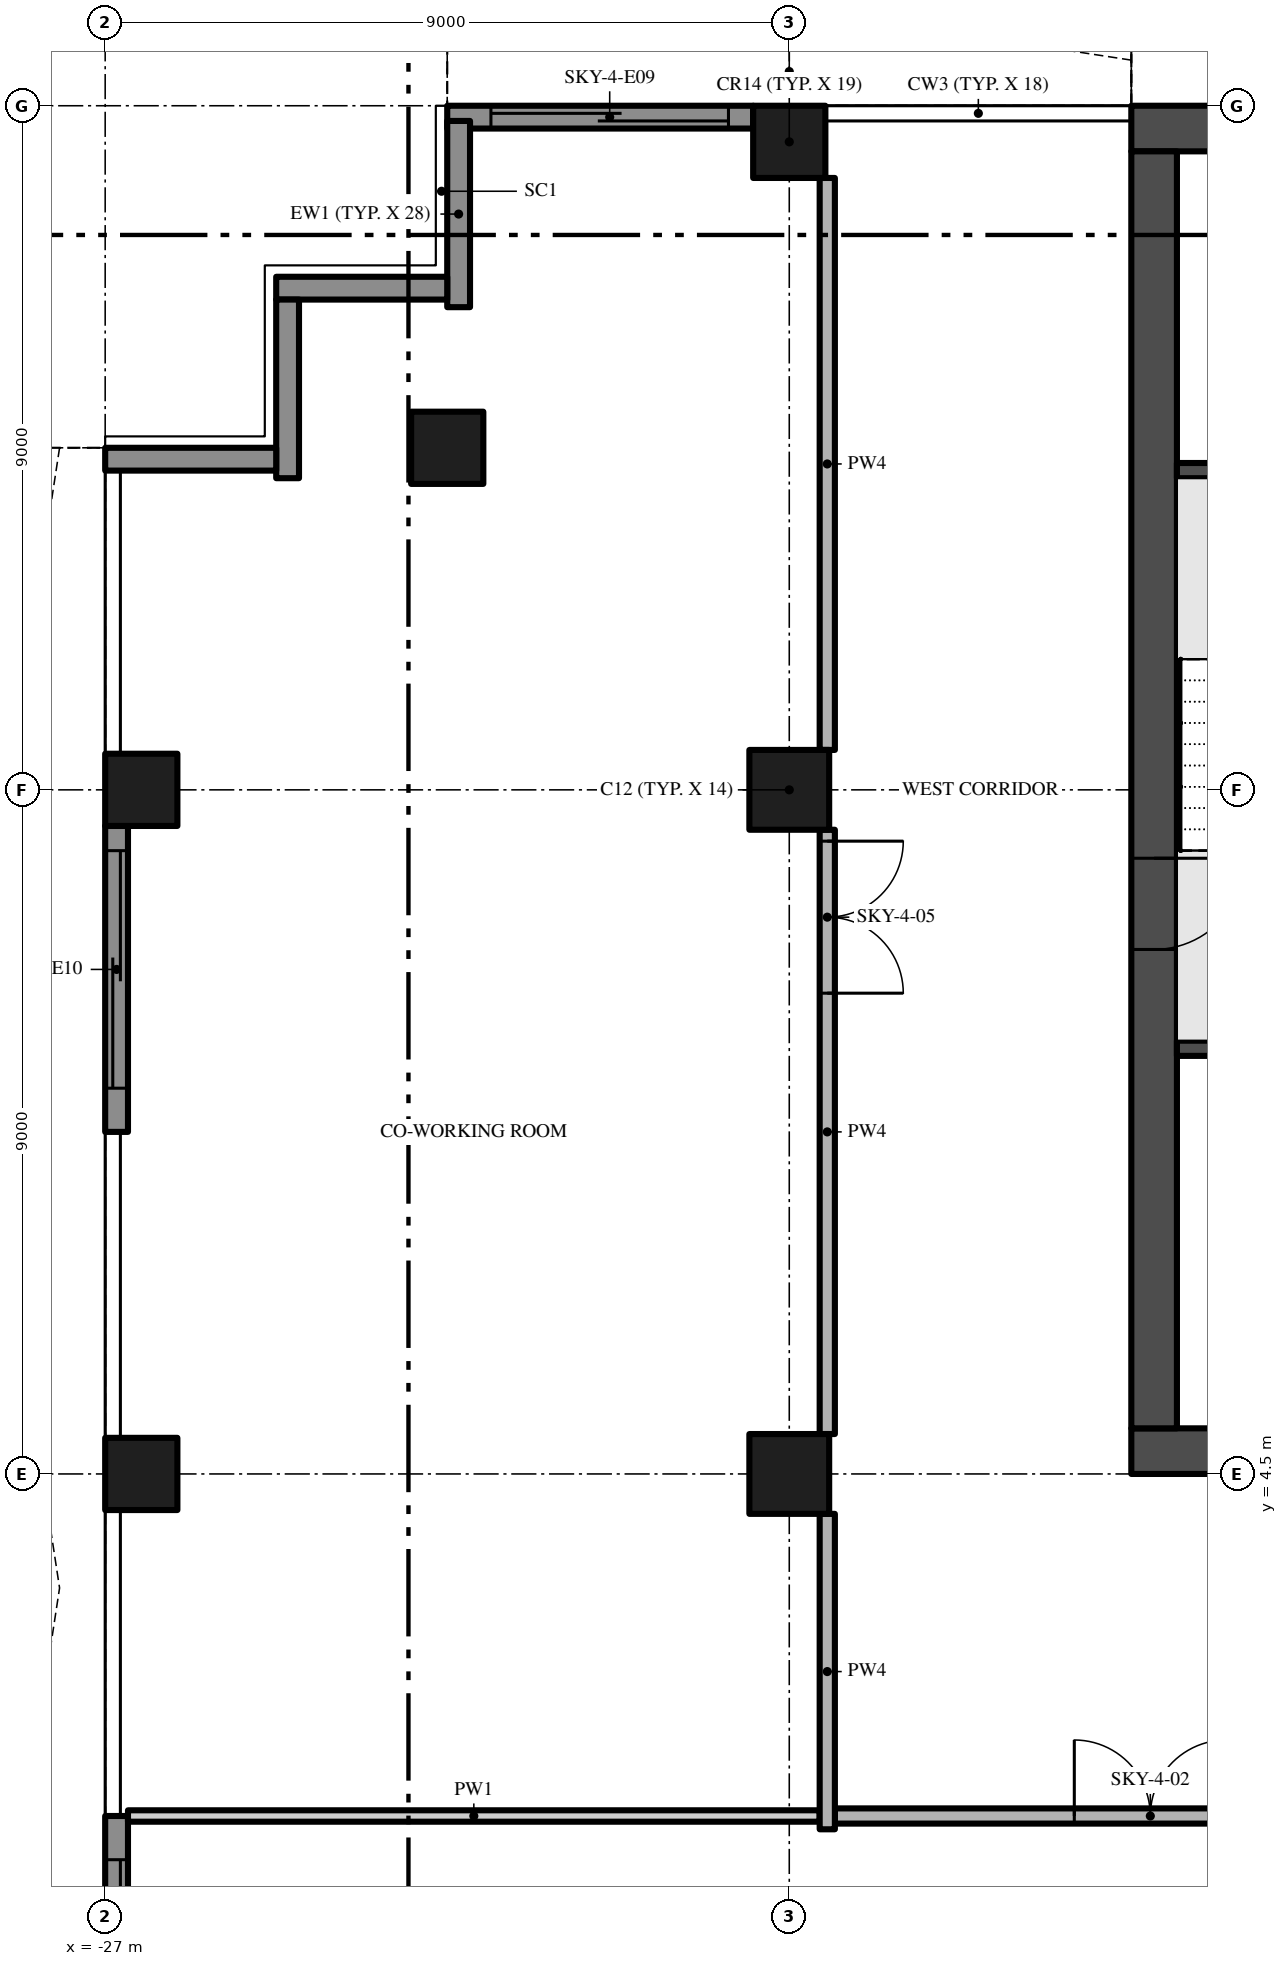
"""IFC4 building model, lengths in metres.
Left out: names, types, materials, properties, quantities, classifications, styles, units other than length and angle.
Written with IfcOpenShell. Run it as: python <this file> out.ifc"""

import sys

from ifc_helpers import new_model, si_unit, direction, frame, frame_2d, origin, origin_2d, place, context, subcontext, project, spatial, polyline, rectangle, outline, extrude, element, fill, save


model = new_model("IFC4")
c1 = context("Model", 3, precision=1e-05, world=origin(), true_north=direction((0.0, 1.0)))
c2 = subcontext(c1, "Body", "Model", "MODEL_VIEW")
j1 = project(units=[si_unit("LENGTHUNIT", "METRE"), si_unit("PLANEANGLEUNIT", "RADIAN")], contexts=[c1])
p1 = place(None, origin())
s1 = spatial("IfcSite", under=j1, at=p1, CompositionType="ELEMENT")
p2 = place(p1, origin())
s2 = spatial("IfcBuilding", under=s1, at=p2, CompositionType="ELEMENT")
p3 = place(p2, frame((0.0, 0.0, 233.8)))
s3 = spatial("IfcBuildingStorey", under=s2, at=p3, CompositionType="ELEMENT", Elevation=233.8)
p4 = place(p3, frame((-13.5, 4.8, -0.3), z_axis=(0.0, 0.0, 1.0), x_axis=(1.0, 0.0, 0.0)))
e1 = element("IfcWall", 1, at=p4, inside=s3, PredefinedType="SHEAR", context=c2, shape_type="SweptSolid", body=[
    extrude(rectangle(XDim=27.0, YDim=0.6, at=frame_2d((13.5, 0.0))), origin(), (0.0, 0.0, 1.0), 5.0),
])
p5 = place(p4, frame((12.0, 0.0, 0.3)))
e2 = element("IfcOpeningElement", 2, at=p5, cuts=e1, PredefinedType="OPENING", context=c2, shape_type="SweptSolid", body=[
    extrude(rectangle(XDim=3.0, YDim=2.4, at=frame_2d((1.5, 1.2))), frame((0.0, 0.31, 0.0), z_axis=(0.0, -1.0, 0.0), x_axis=(1.0, 0.0, 0.0)), (0.0, 0.0, 1.0), 0.62),
])
p6 = place(p4, frame((4.9, 0.0, 0.3)))
e3 = element("IfcOpeningElement", 3, at=p6, cuts=e1, PredefinedType="OPENING", context=c2, shape_type="SweptSolid", body=[
    extrude(rectangle(XDim=1.2, YDim=2.2, at=frame_2d((0.6, 1.1))), frame((0.0, 0.31, 0.0), z_axis=(0.0, -1.0, 0.0), x_axis=(1.0, 0.0, 0.0)), (0.0, 0.0, 1.0), 0.62),
])
p7 = place(p4, frame((20.75, 0.0, 0.3)))
e4 = element("IfcOpeningElement", 4, at=p7, cuts=e1, PredefinedType="OPENING", context=c2, shape_type="SweptSolid", body=[
    extrude(rectangle(XDim=1.5, YDim=2.2, at=frame_2d((0.75, 1.1))), frame((0.0, 0.31, 0.0), z_axis=(0.0, -1.0, 0.0), x_axis=(1.0, 0.0, 0.0)), (0.0, 0.0, 1.0), 0.62),
])
p8 = place(p4, frame((17.4, 0.0, 0.3)))
e5 = element("IfcOpeningElement", 5, at=p8, cuts=e1, PredefinedType="OPENING", context=c2, shape_type="SweptSolid", body=[
    extrude(rectangle(XDim=1.2, YDim=2.2, at=frame_2d((0.6, 1.1))), frame((0.0, 0.31, 0.0), z_axis=(0.0, -1.0, 0.0), x_axis=(1.0, 0.0, 0.0)), (0.0, 0.0, 1.0), 0.62),
])
p9 = place(p3, frame((13.5, 22.2, -0.3), z_axis=(0.0, 0.0, 1.0), x_axis=(-1.0, 0.0, 0.0)))
e6 = element("IfcWall", 6, at=p9, inside=s3, PredefinedType="SHEAR", context=c2, shape_type="SweptSolid", body=[
    extrude(rectangle(XDim=27.0, YDim=0.6, at=frame_2d((13.5, 0.0))), origin(), (0.0, 0.0, 1.0), 5.0),
])
p10 = place(p3, frame((-13.2, 21.9, -0.3), z_axis=(0.0, 0.0, 1.0), x_axis=(0.0, -1.0, 0.0)))
e7 = element("IfcWall", 7, at=p10, inside=s3, PredefinedType="SHEAR", context=c2, shape_type="SweptSolid", body=[
    extrude(rectangle(XDim=16.8, YDim=0.6, at=frame_2d((8.4, 0.0))), origin(), (0.0, 0.0, 1.0), 5.0),
])
p11 = place(p10, frame((9.3, 0.0, 0.3)))
e8 = element("IfcOpeningElement", 8, at=p11, cuts=e7, PredefinedType="OPENING", context=c2, shape_type="SweptSolid", body=[
    extrude(rectangle(XDim=1.2, YDim=2.2, at=frame_2d((0.6, 1.1))), frame((0.0, 0.31, 0.0), z_axis=(0.0, -1.0, 0.0), x_axis=(1.0, 0.0, 0.0)), (0.0, 0.0, 1.0), 0.62),
])
p12 = place(p3, frame((-18.0, 13.5, 0.0), z_axis=(0.0, 0.0, 1.0), x_axis=(1.0, 0.0, 0.0)))
e9 = element("IfcColumn", 9, at=p12, inside=s3, PredefinedType="COLUMN", context=c2, shape_type="SweptSolid", body=[
    extrude(rectangle(XDim=1.05, YDim=1.05, at=origin_2d()), origin(), (0.0, 0.0, 1.0), 4.7),
])
p13 = place(p3, frame((-18.0, 22.025, 0.0), z_axis=(0.0, 0.0, 1.0), x_axis=(1.0, 0.0, 0.0)))
e10 = element("IfcColumn", 10, at=p13, inside=s3, PredefinedType="COLUMN", context=c2, shape_type="SweptSolid", body=[
    extrude(rectangle(XDim=0.95, YDim=0.95, at=origin_2d()), origin(), (0.0, 0.0, 1.0), 4.7),
])
p14 = place(p3, frame((-18.0, 4.5, 0.0), z_axis=(0.0, 0.0, 1.0), x_axis=(1.0, 0.0, 0.0)))
e11 = element("IfcColumn", 11, at=p14, inside=s3, PredefinedType="COLUMN", context=c2, shape_type="SweptSolid", body=[
    extrude(rectangle(XDim=1.05, YDim=1.05, at=origin_2d()), origin(), (0.0, 0.0, 1.0), 4.7),
])
for number, where, z_axis, x_axis in (
    (12, (-26.525, 13.5, 0.0), (0.0, 0.0, 1.0), (1.0, 0.0, 0.0)),
    (13, (-22.5, 18.0, 0.0), (0.0, 0.0, 1.0), (1.0, 0.0, 0.0)),
    (14, (-26.525, 4.5, 0.0), (0.0, 0.0, 1.0), (1.0, 0.0, 0.0)),
):
    element("IfcColumn", number, at=place(p3, frame(where, z_axis=z_axis, x_axis=x_axis)), inside=s3, PredefinedType="COLUMN", context=c2, shape_type="SweptSolid", body=[
        extrude(rectangle(XDim=0.95, YDim=0.95, at=origin_2d()), origin(), (0.0, 0.0, 1.0), 4.7),
    ])
p15 = place(p3, frame((-22.5, 22.35, 0.0), z_axis=(0.0, 0.0, 1.0), x_axis=(1.0, 0.0, 0.0)))
e15 = element("IfcWall", 15, at=p15, inside=s3, PredefinedType="SOLIDWALL", context=c2, shape_type="SweptSolid", body=[
    extrude(rectangle(XDim=4.025, YDim=0.3, at=frame_2d((2.013, 0.0))), origin(), (0.0, 0.0, 1.0), 4.7),
])
p16 = place(p15, frame((0.575, 0.0, 0.0)))
e16 = element("IfcOpeningElement", 16, at=p16, cuts=e15, PredefinedType="OPENING", context=c2, shape_type="SweptSolid", body=[
    extrude(rectangle(XDim=3.125, YDim=2.4, at=frame_2d((1.562, 1.2))), frame((0.0, 0.16, 0.0), z_axis=(0.0, -1.0, 0.0), x_axis=(1.0, 0.0, 0.0)), (0.0, 0.0, 1.0), 0.32),
])
p17 = place(p3, frame((-22.35, 19.85, 0.0), z_axis=(0.0, 0.0, 1.0), x_axis=(0.0, 1.0, 0.0)))
e17 = element("IfcWall", 17, at=p17, inside=s3, PredefinedType="SOLIDWALL", context=c2, shape_type="SweptSolid", body=[
    extrude(rectangle(XDim=2.45, YDim=0.3, at=frame_2d((1.225, 0.0))), origin(), (0.0, 0.0, 1.0), 4.7),
])
p18 = place(p3, frame((-24.75, 20.1, 0.0), z_axis=(0.0, 0.0, 1.0), x_axis=(1.0, 0.0, 0.0)))
e18 = element("IfcWall", 18, at=p18, inside=s3, PredefinedType="SOLIDWALL", context=c2, shape_type="SweptSolid", body=[
    extrude(rectangle(XDim=2.25, YDim=0.3, at=frame_2d((1.125, 0.0))), origin(), (0.0, 0.0, 1.0), 4.7),
])
p19 = place(p3, frame((-24.6, 17.6, 0.0), z_axis=(0.0, 0.0, 1.0), x_axis=(0.0, 1.0, 0.0)))
e19 = element("IfcWall", 19, at=p19, inside=s3, PredefinedType="SOLIDWALL", context=c2, shape_type="SweptSolid", body=[
    extrude(rectangle(XDim=2.35, YDim=0.3, at=frame_2d((1.175, 0.0))), origin(), (0.0, 0.0, 1.0), 4.7),
])
p20 = place(p3, frame((-27.0, 17.85, 0.0), z_axis=(0.0, 0.0, 1.0), x_axis=(1.0, 0.0, 0.0)))
e20 = element("IfcWall", 20, at=p20, inside=s3, PredefinedType="SOLIDWALL", context=c2, shape_type="SweptSolid", body=[
    extrude(rectangle(XDim=2.25, YDim=0.3, at=frame_2d((1.125, 0.0))), origin(), (0.0, 0.0, 1.0), 4.7),
])
p21 = place(p3, frame((-26.85, 9.0, 0.0), z_axis=(0.0, 0.0, 1.0), x_axis=(0.0, 1.0, 0.0)))
e21 = element("IfcWall", 21, at=p21, inside=s3, PredefinedType="SOLIDWALL", context=c2, shape_type="SweptSolid", body=[
    extrude(rectangle(XDim=4.025, YDim=0.3, at=frame_2d((2.013, 0.0))), origin(), (0.0, 0.0, 1.0), 4.7),
])
p22 = place(p21, frame((0.575, 0.0, 0.0)))
e22 = element("IfcOpeningElement", 22, at=p22, cuts=e21, PredefinedType="OPENING", context=c2, shape_type="SweptSolid", body=[
    extrude(rectangle(XDim=3.125, YDim=2.4, at=frame_2d((1.562, 1.2))), frame((0.0, 0.16, 0.0), z_axis=(0.0, -1.0, 0.0), x_axis=(1.0, 0.0, 0.0)), (0.0, 0.0, 1.0), 0.32),
])
p23 = place(p3, frame((-26.85, -4.025, 0.0), z_axis=(0.0, 0.0, 1.0), x_axis=(0.0, 1.0, 0.0)))
e23 = element("IfcWall", 23, at=p23, inside=s3, PredefinedType="SOLIDWALL", context=c2, shape_type="SweptSolid", body=[
    extrude(rectangle(XDim=4.025, YDim=0.3, at=frame_2d((2.013, 0.0))), origin(), (0.0, 0.0, 1.0), 4.7),
])
p24 = place(p23, frame((0.325, 0.0, 0.0)))
e24 = element("IfcOpeningElement", 24, at=p24, cuts=e23, PredefinedType="OPENING", context=c2, shape_type="SweptSolid", body=[
    extrude(rectangle(XDim=3.125, YDim=2.4, at=frame_2d((1.562, 1.2))), frame((0.0, 0.16, 0.0), z_axis=(0.0, -1.0, 0.0), x_axis=(1.0, 0.0, 0.0)), (0.0, 0.0, 1.0), 0.32),
])
p25 = place(p3, origin())
e25 = element("IfcWall", 25, at=p25, inside=s3, PredefinedType="USERDEFINED", context=c2, shape_type="SweptSolid", body=[
    extrude(outline(polyline([(-13.5, 23.1), (-15.0, 23.329), (-16.5, 23.929), (-18.0, 24.671), (-19.5, 25.271), (-21.0, 25.5), (-22.5, 25.271), (-22.462, 25.024), (-21.0, 25.247), (-19.566, 25.028), (-18.102, 24.442), (-16.602, 23.701), (-15.066, 23.086), (-13.538, 22.853), (-13.5, 23.1)])), origin(), (0.0, 0.0, 1.0), 0.9),
])
p26 = place(p3, origin())
e26 = element("IfcWall", 26, at=p26, inside=s3, PredefinedType="USERDEFINED", context=c2, shape_type="SweptSolid", body=[
    extrude(outline(polyline([(-27.6, 18.0), (-27.829, 16.5), (-28.429, 15.0), (-29.171, 13.5), (-29.771, 12.0), (-30.0, 10.5), (-29.771, 9.0), (-29.171, 7.5), (-28.429, 6.0), (-27.829, 4.5), (-27.6, 3.0), (-27.829, 1.5), (-28.429, 0.0), (-29.171, -1.5), (-29.771, -3.0), (-30.0, -4.5), (-29.771, -6.0), (-29.171, -7.5), (-28.429, -9.0), (-27.829, -10.5), (-27.6, -12.0), (-27.829, -13.5), (-28.429, -15.0), (-29.171, -16.5), (-29.771, -18.0), (-29.539, -18.093), (-28.942, -16.602), (-28.201, -15.102), (-27.586, -13.566), (-27.347, -12.0), (-27.586, -10.434), (-28.201, -8.898), (-28.942, -7.398), (-29.528, -5.934), (-29.747, -4.5), (-29.528, -3.066), (-28.942, -1.602), (-28.201, -0.102), (-27.586, 1.434), (-27.347, 3.0), (-27.586, 4.566), (-28.201, 6.102), (-28.942, 7.602), (-29.528, 9.066), (-29.747, 10.5), (-29.528, 11.934), (-28.942, 13.398), (-28.201, 14.898), (-27.586, 16.434), (-27.353, 17.962), (-27.6, 18.0)])), origin(), (0.0, 0.0, 1.0), 0.9),
])
for number, where, z_axis, x_axis in (
    (27, (-12.9, 10.1, 0.0), (0.0, 0.0, 1.0), (1.0, 0.0, 0.0)),
    (28, (-12.9, 17.7, 0.0), (0.0, 0.0, 1.0), (1.0, 0.0, 0.0)),
):
    element("IfcWall", number, at=place(p3, frame(where, z_axis=z_axis, x_axis=x_axis)), inside=s3, PredefinedType="SHEAR", context=c2, shape_type="SweptSolid", body=[
        extrude(rectangle(XDim=3.25, YDim=0.2, at=frame_2d((1.625, 0.0))), origin(), (0.0, 0.0, 1.0), 4.7),
    ])
p27 = place(p3, frame((-17.4, 0.0, 0.0), z_axis=(0.0, 0.0, 1.0), x_axis=(1.0, 0.0, 0.0)))
e29 = element("IfcWall", 29, at=p27, inside=s3, PredefinedType="PARTITIONING", context=c2, shape_type="SweptSolid", body=[
    extrude(rectangle(XDim=34.8, YDim=0.2, at=frame_2d((17.4, 0.0))), origin(), (0.0, 0.0, 1.0), 4.7),
])
p28 = place(p27, frame((3.15, 0.0, 0.0)))
e30 = element("IfcOpeningElement", 30, at=p28, cuts=e29, PredefinedType="OPENING", context=c2, shape_type="SweptSolid", body=[
    extrude(rectangle(XDim=2.0, YDim=2.4, at=frame_2d((1.0, 1.2))), frame((0.0, 0.11, 0.0), z_axis=(0.0, -1.0, 0.0), x_axis=(1.0, 0.0, 0.0)), (0.0, 0.0, 1.0), 0.22),
])
p29 = place(p27, frame((16.4, 0.0, 0.0)))
e31 = element("IfcOpeningElement", 31, at=p29, cuts=e29, PredefinedType="OPENING", context=c2, shape_type="SweptSolid", body=[
    extrude(rectangle(XDim=2.0, YDim=2.4, at=frame_2d((1.0, 1.2))), frame((0.0, 0.11, 0.0), z_axis=(0.0, -1.0, 0.0), x_axis=(1.0, 0.0, 0.0)), (0.0, 0.0, 1.0), 0.22),
])
p30 = place(p27, frame((29.65, 0.0, 0.0)))
e32 = element("IfcOpeningElement", 32, at=p30, cuts=e29, PredefinedType="OPENING", context=c2, shape_type="SweptSolid", body=[
    extrude(rectangle(XDim=2.0, YDim=2.4, at=frame_2d((1.0, 1.2))), frame((0.0, 0.11, 0.0), z_axis=(0.0, -1.0, 0.0), x_axis=(1.0, 0.0, 0.0)), (0.0, 0.0, 1.0), 0.22),
])
p31 = place(p3, frame((-26.7, 0.0, 0.0), z_axis=(0.0, 0.0, 1.0), x_axis=(1.0, 0.0, 0.0)))
e33 = element("IfcWall", 33, at=p31, inside=s3, PredefinedType="PARTITIONING", context=c2, shape_type="SweptSolid", body=[
    extrude(rectangle(XDim=9.1, YDim=0.15, at=frame_2d((4.55, 0.0))), origin(), (0.0, 0.0, 1.0), 4.7),
])
p32 = place(p3, frame((-17.5, -0.175, 0.0), z_axis=(0.0, 0.0, 1.0), x_axis=(0.0, 1.0, 0.0)))
e34 = element("IfcWall", 34, at=p32, inside=s3, PredefinedType="PARTITIONING", context=c2, shape_type="SweptSolid", body=[
    extrude(rectangle(XDim=4.15, YDim=0.2, at=frame_2d((2.075, 0.0))), origin(), (0.0, 0.0, 1.0), 4.7),
])
p33 = place(p3, frame((-17.5, 12.975, 0.0), z_axis=(0.0, 0.0, 1.0), x_axis=(0.0, -1.0, 0.0)))
e35 = element("IfcWall", 35, at=p33, inside=s3, PredefinedType="PARTITIONING", context=c2, shape_type="SweptSolid", body=[
    extrude(rectangle(XDim=7.95, YDim=0.2, at=frame_2d((3.975, 0.0))), origin(), (0.0, 0.0, 1.0), 4.7),
])
p34 = place(p33, frame((0.15, 0.0, 0.0)))
e36 = element("IfcOpeningElement", 36, at=p34, cuts=e35, PredefinedType="OPENING", context=c2, shape_type="SweptSolid", body=[
    extrude(rectangle(XDim=2.0, YDim=2.4, at=frame_2d((1.0, 1.2))), frame((0.0, 0.11, 0.0), z_axis=(0.0, -1.0, 0.0), x_axis=(1.0, 0.0, 0.0)), (0.0, 0.0, 1.0), 0.22),
])
p35 = place(p3, frame((-17.5, 14.025, 0.0), z_axis=(0.0, 0.0, 1.0), x_axis=(0.0, 1.0, 0.0)))
e37 = element("IfcWall", 37, at=p35, inside=s3, PredefinedType="PARTITIONING", context=c2, shape_type="SweptSolid", body=[
    extrude(rectangle(XDim=7.525, YDim=0.2, at=frame_2d((3.763, 0.0))), origin(), (0.0, 0.0, 1.0), 4.7),
])
p36 = place(p16, origin())
e38 = element("IfcDoor", 38, at=p36, inside=s3, OperationType="SINGLE_SWING_LEFT", PredefinedType="DOOR", context=c2, shape_type="SweptSolid", body=[
    extrude(rectangle(XDim=3.125, YDim=2.4, at=frame_2d((1.562, 1.2))), frame((0.0, 0.025, 0.0), z_axis=(0.0, -1.0, 0.0), x_axis=(1.0, 0.0, 0.0)), (0.0, 0.0, 1.0), 0.05),
])
fill(e16, e38)
p37 = place(p22, origin())
e39 = element("IfcDoor", 39, at=p37, inside=s3, OperationType="SINGLE_SWING_LEFT", PredefinedType="DOOR", context=c2, shape_type="SweptSolid", body=[
    extrude(rectangle(XDim=3.125, YDim=2.4, at=frame_2d((1.562, 1.2))), frame((0.0, 0.025, 0.0), z_axis=(0.0, -1.0, 0.0), x_axis=(1.0, 0.0, 0.0)), (0.0, 0.0, 1.0), 0.05),
])
fill(e22, e39)
p38 = place(p24, origin())
e40 = element("IfcDoor", 40, at=p38, inside=s3, OperationType="SINGLE_SWING_LEFT", PredefinedType="DOOR", context=c2, shape_type="SweptSolid", body=[
    extrude(rectangle(XDim=3.125, YDim=2.4, at=frame_2d((1.562, 1.2))), frame((0.0, 0.025, 0.0), z_axis=(0.0, -1.0, 0.0), x_axis=(1.0, 0.0, 0.0)), (0.0, 0.0, 1.0), 0.05),
])
fill(e24, e40)
p39 = place(p11, frame((1.2, 0.0, 0.0), z_axis=(0.0, 0.0, 1.0), x_axis=(-1.0, 0.0, 0.0)))
e41 = element("IfcDoor", 41, at=p39, inside=s3, OperationType="SINGLE_SWING_RIGHT", PredefinedType="DOOR", context=c2, shape_type="SweptSolid", body=[
    extrude(rectangle(XDim=1.2, YDim=2.2, at=frame_2d((0.6, 1.1))), frame((0.0, 0.025, 0.0), z_axis=(0.0, -1.0, 0.0), x_axis=(1.0, 0.0, 0.0)), (0.0, 0.0, 1.0), 0.05),
])
fill(e8, e41)
p40 = place(p28, origin())
e42 = element("IfcDoor", 42, at=p40, inside=s3, OperationType="DOUBLE_DOOR_SINGLE_SWING", PredefinedType="DOOR", context=c2, shape_type="SweptSolid", body=[
    extrude(rectangle(XDim=2.0, YDim=2.4, at=frame_2d((1.0, 1.2))), frame((0.0, 0.025, 0.0), z_axis=(0.0, -1.0, 0.0), x_axis=(1.0, 0.0, 0.0)), (0.0, 0.0, 1.0), 0.05),
])
fill(e30, e42)
p41 = place(p34, origin())
e43 = element("IfcDoor", 43, at=p41, inside=s3, OperationType="DOUBLE_DOOR_SINGLE_SWING", PredefinedType="DOOR", context=c2, shape_type="SweptSolid", body=[
    extrude(rectangle(XDim=2.0, YDim=2.4, at=frame_2d((1.0, 1.2))), frame((0.0, 0.025, 0.0), z_axis=(0.0, -1.0, 0.0), x_axis=(1.0, 0.0, 0.0)), (0.0, 0.0, 1.0), 0.05),
])
fill(e36, e43)
save(model, sys.argv[1])
